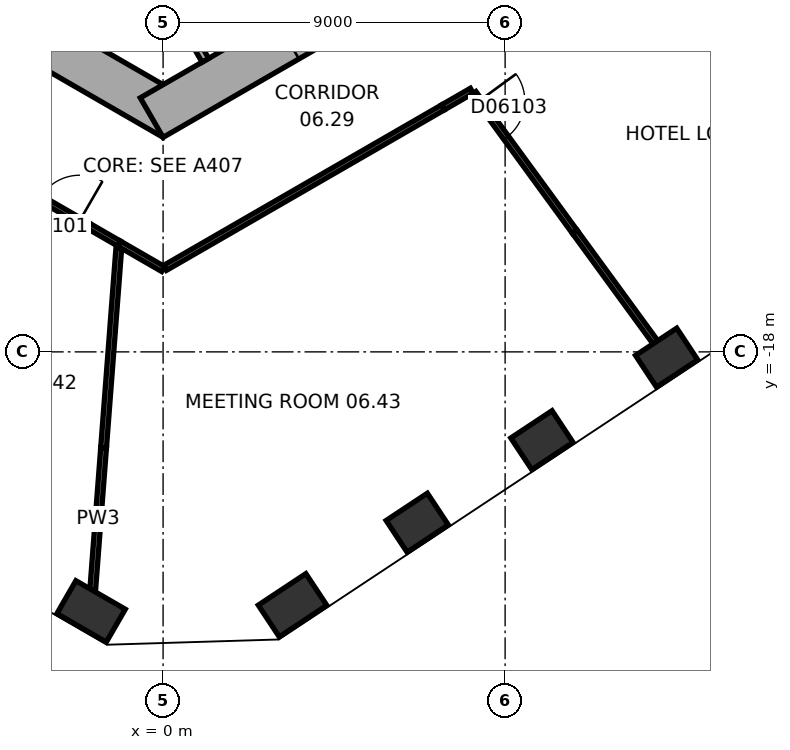
"""IFC4 building model, lengths in metres.
Left out: names, types, materials, properties, quantities, classifications, styles, units other than length and angle.
Written with IfcOpenShell. Run it as: python <this file> out.ifc"""

import sys

from ifc_helpers import new_model, si_unit, direction, frame, frame_2d, origin, origin_2d, place, context, subcontext, project, spatial, rectangle, extrude, element, fill, save


model = new_model("IFC4")
c1 = context("Model", 3, precision=1e-05, world=origin(), true_north=direction((0.0, 1.0)))
c2 = subcontext(c1, "Body", "Model", "MODEL_VIEW")
j1 = project(units=[si_unit("LENGTHUNIT", "METRE"), si_unit("PLANEANGLEUNIT", "RADIAN")], contexts=[c1])
p1 = place(None, origin())
s1 = spatial("IfcSite", under=j1, at=p1, CompositionType="ELEMENT")
p2 = place(p1, origin())
s2 = spatial("IfcBuilding", under=s1, at=p2, CompositionType="ELEMENT")
p3 = place(p2, frame((0.0, 0.0, 39.0)))
s3 = spatial("IfcBuildingStorey", under=s2, at=p3, CompositionType="ELEMENT", Elevation=39.0)
for number, where, z_axis, x_axis in (
    (1, (-1.895, -24.829, 0.0), (0.0, 0.0, 1.0), (0.866, -0.5, 0.0)),
    (2, (3.407, -24.667, 0.0), (0.0, 0.0, 1.0), (0.834, 0.552, 0.0)),
):
    element("IfcColumn", number, at=place(p3, frame(where, z_axis=z_axis, x_axis=x_axis)), inside=s3, PredefinedType="COLUMN", context=c2, shape_type="SweptSolid", body=[
        extrude(rectangle(XDim=1.5, YDim=1.0, at=origin_2d()), origin(), (0.0, 0.0, 1.0), 5.0),
    ])
for number, where, z_axis, x_axis in (
    (3, (6.688, -22.496, 0.0), (0.0, 0.0, 1.0), (0.834, 0.552, 0.0)),
    (4, (9.969, -20.324, 0.0), (0.0, 0.0, 1.0), (0.834, 0.552, 0.0)),
    (5, (13.25, -18.152, 0.0), (0.0, 0.0, 1.0), (0.834, 0.552, 0.0)),
):
    element("IfcColumn", number, at=place(p3, frame(where, z_axis=z_axis, x_axis=x_axis)), inside=s3, PredefinedType="COLUMN", context=c2, shape_type="SweptSolid", body=[
        extrude(rectangle(XDim=1.3, YDim=1.0, at=origin_2d()), origin(), (0.0, 0.0, 1.0), 5.0),
    ])
p4 = place(p3, frame((-10.4, -5.658, 0.0), z_axis=(0.0, 0.0, 1.0), x_axis=(0.866021384402, -0.500006961711, 0.0)))
e6 = element("IfcWall", 6, at=p4, inside=s3, PredefinedType="SHEAR", context=c2, shape_type="SweptSolid", body=[
    extrude(rectangle(XDim=12.355, YDim=1.2, at=frame_2d((6.178, 0.0))), origin(), (0.0, 0.0, 1.0), 5.0),
])
p5 = place(p4, frame((6.378, 0.0, 0.0)))
e7 = element("IfcOpeningElement", 7, at=p5, cuts=e6, PredefinedType="OPENING", context=c2, shape_type="SweptSolid", body=[
    extrude(rectangle(XDim=1.5, YDim=2.1, at=frame_2d((0.75, 1.05))), frame((0.0, 0.61, 0.0), z_axis=(0.0, -1.0, 0.0), x_axis=(1.0, 0.0, 0.0)), (0.0, 0.0, 1.0), 1.22),
])
p6 = place(p4, frame((3.228, 0.0, 0.0)))
e8 = element("IfcOpeningElement", 8, at=p6, cuts=e6, PredefinedType="OPENING", context=c2, shape_type="SweptSolid", body=[
    extrude(rectangle(XDim=0.9, YDim=2.1, at=frame_2d((0.45, 1.05))), frame((0.0, 0.61, 0.0), z_axis=(0.0, -1.0, 0.0), x_axis=(1.0, 0.0, 0.0)), (0.0, 0.0, 1.0), 1.22),
])
p7 = place(p3, frame((-0.3, -11.836, 0.0), z_axis=(0.0, 0.0, 1.0), x_axis=(0.866021384402, 0.500006961711, 0.0)))
e9 = element("IfcWall", 9, at=p7, inside=s3, PredefinedType="SHEAR", context=c2, shape_type="SweptSolid", body=[
    extrude(rectangle(XDim=12.355, YDim=1.2, at=frame_2d((6.178, 0.0))), origin(), (0.0, 0.0, 1.0), 5.0),
])
p8 = place(p7, frame((4.128, 0.0, 0.0)))
e10 = element("IfcOpeningElement", 10, at=p8, cuts=e9, PredefinedType="OPENING", context=c2, shape_type="SweptSolid", body=[
    extrude(rectangle(XDim=0.9, YDim=2.1, at=frame_2d((0.45, 1.05))), frame((0.0, 0.61, 0.0), z_axis=(0.0, -1.0, 0.0), x_axis=(1.0, 0.0, 0.0)), (0.0, 0.0, 1.0), 1.22),
])
p9 = place(p7, frame((7.928, 0.0, 0.0)))
e11 = element("IfcOpeningElement", 11, at=p9, cuts=e9, PredefinedType="OPENING", context=c2, shape_type="SweptSolid", body=[
    extrude(rectangle(XDim=1.1, YDim=2.1, at=frame_2d((0.55, 1.05))), frame((0.0, 0.61, 0.0), z_axis=(0.0, -1.0, 0.0), x_axis=(1.0, 0.0, 0.0)), (0.0, 0.0, 1.0), 1.22),
])
p10 = place(p3, frame((0.013, -8.422, 0.0), z_axis=(0.0, 0.0, 1.0), x_axis=(0.500077893725, -0.86598042715, 0.0)))
e12 = element("IfcWall", 12, at=p10, inside=s3, PredefinedType="PARTITIONING", context=c2, shape_type="SweptSolid", body=[
    extrude(rectangle(XDim=2.2, YDim=0.2, at=frame_2d((1.1, 0.0))), origin(), (0.0, 0.0, 1.0), 4.75),
])
p11 = place(p3, frame((-1.566, -20.523, 0.0), z_axis=(0.0, 0.0, 1.0), x_axis=(-0.076160714472, -0.997095554885, 0.0)))
e13 = element("IfcWall", 13, at=p11, inside=s3, PredefinedType="PARTITIONING", context=c2, shape_type="SweptSolid", body=[
    extrude(rectangle(XDim=3.763, YDim=0.15, at=frame_2d((1.882, 0.0))), origin(), (0.0, 0.0, 1.0), 4.75),
])
p12 = place(p3, frame((-1.566, -20.523, 0.0), z_axis=(0.0, 0.0, 1.0), x_axis=(0.076111619942, 0.997099303635, 0.0)))
e14 = element("IfcWall", 14, at=p12, inside=s3, PredefinedType="PARTITIONING", context=c2, shape_type="SweptSolid", body=[
    extrude(rectangle(XDim=5.267, YDim=0.15, at=frame_2d((2.634, 0.0))), origin(), (0.0, 0.0, 1.0), 4.75),
])
p13 = place(p3, frame((0.0, -15.82, 0.0), z_axis=(0.0, 0.0, 1.0), x_axis=(-0.866005883338, 0.50003380888, 0.0)))
e15 = element("IfcWall", 15, at=p13, inside=s3, PredefinedType="PARTITIONING", context=c2, shape_type="SweptSolid", body=[
    extrude(rectangle(XDim=1.335, YDim=0.15, at=frame_2d((0.667, 0.0))), origin(), (0.0, 0.0, 1.0), 4.75),
])
p14 = place(p3, frame((-1.156, -15.152, 0.0), z_axis=(0.0, 0.0, 1.0), x_axis=(-0.865958968312, 0.500115051963, 0.0)))
e16 = element("IfcWall", 16, at=p14, inside=s3, PredefinedType="PARTITIONING", context=c2, shape_type="SweptSolid", body=[
    extrude(rectangle(XDim=0.951, YDim=0.15, at=frame_2d((0.476, 0.0))), origin(), (0.0, 0.0, 1.0), 4.75),
])
p15 = place(p3, frame((10.835, -14.844, 0.0), z_axis=(0.0, 0.0, 1.0), x_axis=(0.589604414089, -0.807692165919, 0.0)))
e17 = element("IfcWall", 17, at=p15, inside=s3, PredefinedType="PARTITIONING", context=c2, shape_type="SweptSolid", body=[
    extrude(rectangle(XDim=3.594, YDim=0.15, at=frame_2d((1.797, 0.0))), origin(), (0.0, 0.0, 1.0), 4.75),
])
p16 = place(p3, frame((-1.979, -14.677, 0.0), z_axis=(0.0, 0.0, 1.0), x_axis=(-0.866046247233, 0.49996389635, 0.0)))
e18 = element("IfcWall", 18, at=p16, inside=s3, PredefinedType="PARTITIONING", context=c2, shape_type="SweptSolid", body=[
    extrude(rectangle(XDim=3.851, YDim=0.15, at=frame_2d((1.926, 0.0))), origin(), (0.0, 0.0, 1.0), 4.75),
])
p17 = place(p16, frame((0.25, 0.0, 0.0)))
e19 = element("IfcOpeningElement", 19, at=p17, cuts=e18, PredefinedType="OPENING", context=c2, shape_type="SweptSolid", body=[
    extrude(rectangle(XDim=1.2, YDim=2.1, at=frame_2d((0.6, 1.05))), frame((0.0, 0.085, 0.0), z_axis=(0.0, -1.0, 0.0), x_axis=(1.0, 0.0, 0.0)), (0.0, 0.0, 1.0), 0.17),
])
p18 = place(p3, frame((7.369, -11.564, 0.0), z_axis=(0.0, 0.0, 1.0), x_axis=(-0.86600466253, -0.500035923186, 0.0)))
e20 = element("IfcWall", 20, at=p18, inside=s3, PredefinedType="PARTITIONING", context=c2, shape_type="SweptSolid", body=[
    extrude(rectangle(XDim=8.45, YDim=0.15, at=frame_2d((4.225, 0.0))), origin(), (0.0, 0.0, 1.0), 4.75),
])
p19 = place(p3, frame((7.369, -11.564, 0.0), z_axis=(0.0, 0.0, 1.0), x_axis=(0.865956808668, 0.50011879141, 0.0)))
e21 = element("IfcWall", 21, at=p19, inside=s3, PredefinedType="PARTITIONING", context=c2, shape_type="SweptSolid", body=[
    extrude(rectangle(XDim=0.871, YDim=0.15, at=frame_2d((0.436, 0.0))), origin(), (0.0, 0.0, 1.0), 4.75),
])
p20 = place(p3, frame((8.171, -11.194, 0.0), z_axis=(0.0, 0.0, 1.0), x_axis=(0.589561466491, -0.807723515337, 0.0)))
e22 = element("IfcWall", 22, at=p20, inside=s3, PredefinedType="PARTITIONING", context=c2, shape_type="SweptSolid", body=[
    extrude(rectangle(XDim=4.52, YDim=0.15, at=frame_2d((2.26, 0.0))), origin(), (0.0, 0.0, 1.0), 4.75),
])
p21 = place(p20, frame((0.25, 0.0, 0.0)))
e23 = element("IfcOpeningElement", 23, at=p21, cuts=e22, PredefinedType="OPENING", context=c2, shape_type="SweptSolid", body=[
    extrude(rectangle(XDim=1.2, YDim=2.1, at=frame_2d((0.6, 1.05))), frame((0.0, 0.085, 0.0), z_axis=(0.0, -1.0, 0.0), x_axis=(1.0, 0.0, 0.0)), (0.0, 0.0, 1.0), 0.17),
])
p22 = place(p17, origin())
e24 = element("IfcDoor", 24, at=p22, inside=s3, OperationType="SINGLE_SWING_LEFT", PredefinedType="DOOR", context=c2, shape_type="SweptSolid", body=[
    extrude(rectangle(XDim=1.2, YDim=2.1, at=frame_2d((0.6, 1.05))), frame((0.0, 0.025, 0.0), z_axis=(0.0, -1.0, 0.0), x_axis=(1.0, 0.0, 0.0)), (0.0, 0.0, 1.0), 0.05),
])
fill(e19, e24)
p23 = place(p21, origin())
e25 = element("IfcDoor", 25, at=p23, inside=s3, OperationType="SINGLE_SWING_LEFT", PredefinedType="DOOR", context=c2, shape_type="SweptSolid", body=[
    extrude(rectangle(XDim=1.2, YDim=2.1, at=frame_2d((0.6, 1.05))), frame((0.0, 0.025, 0.0), z_axis=(0.0, -1.0, 0.0), x_axis=(1.0, 0.0, 0.0)), (0.0, 0.0, 1.0), 0.05),
])
fill(e23, e25)
save(model, sys.argv[1])
